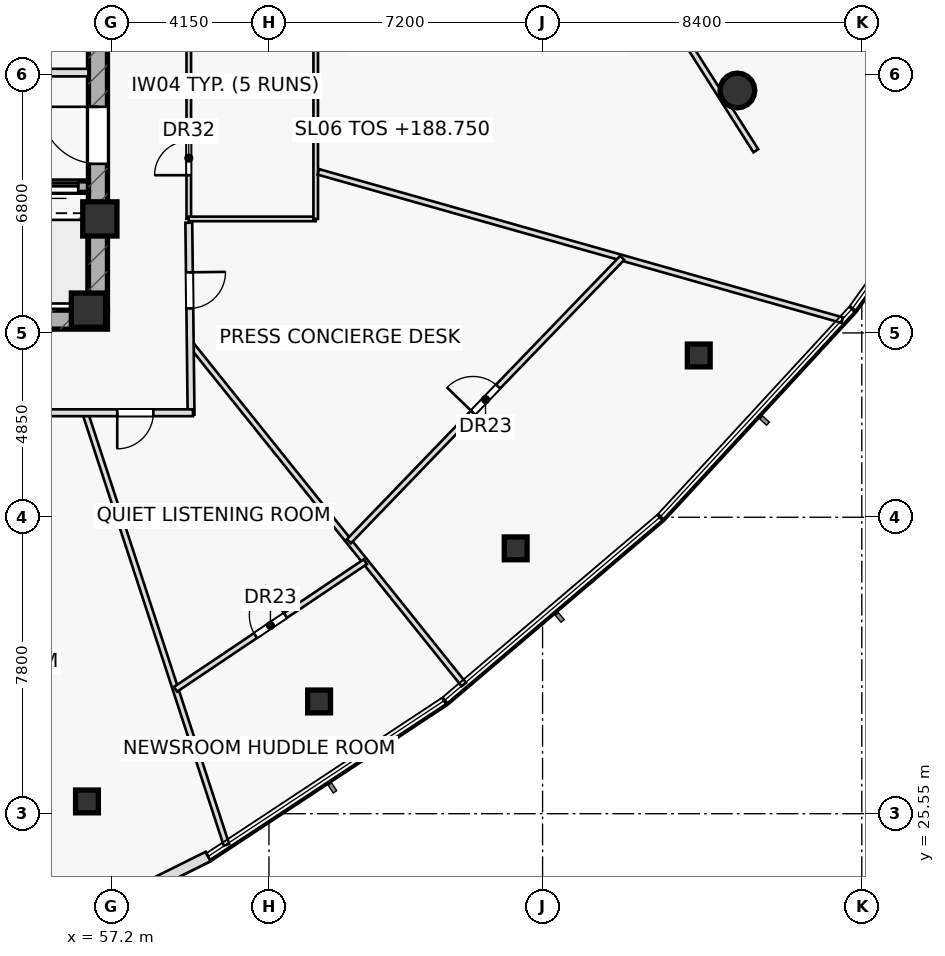
"""IFC4 building model, lengths in metres.
Left out: names, types, materials, properties, quantities, classifications, styles, units other than length and angle.
Written with IfcOpenShell. Run it as: python <this file> out.ifc"""

import sys

from ifc_helpers import new_model, si_unit, direction, frame, frame_2d, origin, origin_2d, place, context, subcontext, project, spatial, rectangle, hollow_rectangle, hollow_circle, extrude, element, fill, save


model = new_model("IFC4")
c1 = context("Model", 3, precision=1e-05, world=origin(), true_north=direction((0.0, 1.0)))
c2 = subcontext(c1, "Body", "Model", "MODEL_VIEW")
j1 = project(units=[si_unit("LENGTHUNIT", "METRE"), si_unit("PLANEANGLEUNIT", "RADIAN")], contexts=[c1])
p1 = place(None, origin())
s1 = spatial("IfcSite", under=j1, at=p1, CompositionType="ELEMENT")
p2 = place(p1, origin())
s2 = spatial("IfcBuilding", under=s1, at=p2, CompositionType="ELEMENT")
p3 = place(p2, frame((0.0, 0.0, 188.75)))
s3 = spatial("IfcBuildingStorey", under=s2, at=p3, CompositionType="ELEMENT", Elevation=188.75)
p4 = place(p3, frame((42.9, 38.55, 0.0), z_axis=(0.0, 0.0, 1.0), x_axis=(1.0, 0.0, 0.0)))
e1 = element("IfcWall", 1, at=p4, inside=s3, PredefinedType="SHEAR", context=c2, shape_type="SweptSolid", body=[
    extrude(rectangle(XDim=14.2, YDim=0.5, at=frame_2d((7.1, 0.0))), origin(), (0.0, 0.0, 1.0), 3.55),
])
p5 = place(p4, frame((0.78, 0.0, 0.0)))
e2 = element("IfcOpeningElement", 2, at=p5, cuts=e1, PredefinedType="OPENING", context=c2, shape_type="SweptSolid", body=[
    extrude(rectangle(XDim=1.05, YDim=2.2, at=frame_2d((0.525, 1.1))), frame((0.0, 0.26, 0.0), z_axis=(0.0, -1.0, 0.0), x_axis=(1.0, 0.0, 0.0)), (0.0, 0.0, 1.0), 0.52),
])
p6 = place(p3, frame((56.85, 38.8, 0.0), z_axis=(0.0, 0.0, 1.0), x_axis=(0.0, 1.0, 0.0)))
e3 = element("IfcWall", 3, at=p6, inside=s3, PredefinedType="SHEAR", context=c2, shape_type="SweptSolid", body=[
    extrude(rectangle(XDim=12.4, YDim=0.5, at=frame_2d((6.2, 0.0))), origin(), (0.0, 0.0, 1.0), 3.55),
])
p7 = place(p6, frame((3.85, 0.0, 0.0)))
e4 = element("IfcOpeningElement", 4, at=p7, cuts=e3, PredefinedType="OPENING", context=c2, shape_type="SweptSolid", body=[
    extrude(rectangle(XDim=1.5, YDim=2.2, at=frame_2d((0.75, 1.1))), frame((0.0, 0.26, 0.0), z_axis=(0.0, -1.0, 0.0), x_axis=(1.0, 0.0, 0.0)), (0.0, 0.0, 1.0), 0.52),
])
p8 = place(p3, frame((43.4, 42.05, 0.0), z_axis=(0.0, 0.0, 1.0), x_axis=(1.0, 0.0, 0.0)))
e5 = element("IfcWall", 5, at=p8, inside=s3, PredefinedType="SHEAR", context=c2, shape_type="SweptSolid", body=[
    extrude(rectangle(XDim=13.2, YDim=0.3, at=frame_2d((6.6, 0.0))), origin(), (0.0, 0.0, 1.0), 3.55),
])
p9 = place(p8, frame((8.37, 0.0, 0.0)))
e6 = element("IfcOpeningElement", 6, at=p9, cuts=e5, PredefinedType="OPENING", context=c2, shape_type="SweptSolid", body=[
    extrude(rectangle(XDim=1.1, YDim=2.15, at=frame_2d((0.55, 1.075))), frame((0.0, 0.16, 0.0), z_axis=(0.0, -1.0, 0.0), x_axis=(1.0, 0.0, 0.0)), (0.0, 0.0, 1.0), 0.32),
])
p10 = place(p8, frame((10.09, 0.0, 0.0)))
e7 = element("IfcOpeningElement", 7, at=p10, cuts=e5, PredefinedType="OPENING", context=c2, shape_type="SweptSolid", body=[
    extrude(rectangle(XDim=1.1, YDim=2.15, at=frame_2d((0.55, 1.075))), frame((0.0, 0.16, 0.0), z_axis=(0.0, -1.0, 0.0), x_axis=(1.0, 0.0, 0.0)), (0.0, 0.0, 1.0), 0.32),
])
p11 = place(p8, frame((11.83, 0.0, 0.0)))
e8 = element("IfcOpeningElement", 8, at=p11, cuts=e5, PredefinedType="OPENING", context=c2, shape_type="SweptSolid", body=[
    extrude(rectangle(XDim=1.1, YDim=2.15, at=frame_2d((0.55, 1.075))), frame((0.0, 0.16, 0.0), z_axis=(0.0, -1.0, 0.0), x_axis=(1.0, 0.0, 0.0)), (0.0, 0.0, 1.0), 0.32),
])
for number, where, z_axis, x_axis in (
    (9, (56.9, 41.2, 0.0), (0.0, 0.0, 1.0), (1.0, 0.0, 0.0)),
    (10, (56.6, 38.8, 0.0), (0.0, 0.0, 1.0), (1.0, 0.0, 0.0)),
):
    element("IfcColumn", number, at=place(p3, frame(where, z_axis=z_axis, x_axis=x_axis)), inside=s3, PredefinedType="COLUMN", context=c2, shape_type="SweptSolid", body=[
        extrude(rectangle(XDim=0.9, YDim=0.9, at=origin_2d()), origin(), (0.0, 0.0, 1.0), 3.55),
    ])
for number, where, z_axis, x_axis in (
    (11, (56.561, 25.873, 0.0), (0.0, 0.0, 1.0), (1.0, 0.0, 0.0)),
    (12, (62.669, 28.503, 0.0), (0.0, 0.0, 1.0), (1.0, 0.0, 0.0)),
    (13, (67.842, 32.532, 0.0), (0.0, 0.0, 1.0), (1.0, 0.0, 0.0)),
    (14, (72.659, 37.607, 0.0), (0.0, 0.0, 1.0), (1.0, 0.0, 0.0)),
):
    element("IfcColumn", number, at=place(p3, frame(where, z_axis=z_axis, x_axis=x_axis)), inside=s3, PredefinedType="COLUMN", context=c2, shape_type="SweptSolid", body=[
        extrude(hollow_rectangle(XDim=0.6, YDim=0.6, WallThickness=0.036, at=origin_2d()), origin(), (0.0, 0.0, 1.0), 3.55),
    ])
p12 = place(p3, frame((73.676, 44.58, 0.0), z_axis=(0.0, 0.0, 1.0), x_axis=(1.0, 0.0, 0.0)))
e15 = element("IfcColumn", 15, at=p12, inside=s3, PredefinedType="COLUMN", context=c2, shape_type="SweptSolid", body=[
    extrude(hollow_circle(Radius=0.457, WallThickness=0.04, at=origin_2d()), origin(), (0.0, 0.0, 1.0), 3.55),
])
p13 = place(p3, frame((50.65, 45.05, 0.0), z_axis=(0.0, 0.0, 1.0), x_axis=(1.0, 0.0, 0.0)))
e16 = element("IfcWall", 16, at=p13, inside=s3, PredefinedType="PARTITIONING", context=c2, shape_type="SweptSolid", body=[
    extrude(rectangle(XDim=5.95, YDim=0.2, at=frame_2d((2.975, 0.0))), origin(), (0.0, 0.0, 1.0), 3.55),
])
p14 = place(p13, frame((1.35, 0.0, 0.0)))
e17 = element("IfcOpeningElement", 17, at=p14, cuts=e16, PredefinedType="OPENING", context=c2, shape_type="SweptSolid", body=[
    extrude(rectangle(XDim=1.5, YDim=2.2, at=frame_2d((0.75, 1.1))), frame((0.0, 0.11, 0.0), z_axis=(0.0, -1.0, 0.0), x_axis=(1.0, 0.0, 0.0)), (0.0, 0.0, 1.0), 0.22),
])
p15 = place(p3, frame((74.163, 42.993, 0.0), z_axis=(0.0, 0.0, 1.0), x_axis=(-0.53628142437, 0.844039237166, 0.0)))
e18 = element("IfcWall", 18, at=p15, inside=s3, PredefinedType="PARTITIONING", context=c2, shape_type="SweptSolid", body=[
    extrude(rectangle(XDim=10.267, YDim=0.15, at=frame_2d((5.133, 0.0))), origin(), (0.0, 0.0, 1.0), 2.935),
])
p16 = place(p3, frame((59.24, 41.2, 0.0), z_axis=(0.0, 0.0, 1.0), x_axis=(0.0, 1.0, 0.0)))
e19 = element("IfcWall", 19, at=p16, inside=s3, PredefinedType="PARTITIONING", context=c2, shape_type="SweptSolid", body=[
    extrude(rectangle(XDim=7.0, YDim=0.12, at=frame_2d((3.5, 0.0))), origin(), (0.0, 0.0, 1.0), 3.55),
])
p17 = place(p16, frame((1.15, 0.0, 0.0)))
e20 = element("IfcOpeningElement", 20, at=p17, cuts=e19, PredefinedType="OPENING", context=c2, shape_type="SweptSolid", body=[
    extrude(rectangle(XDim=0.9, YDim=2.05, at=frame_2d((0.45, 1.025))), frame((0.0, 0.07, 0.0), z_axis=(0.0, -1.0, 0.0), x_axis=(1.0, 0.0, 0.0)), (0.0, 0.0, 1.0), 0.14),
])
p18 = place(p16, frame((4.7, 0.0, 0.0)))
e21 = element("IfcOpeningElement", 21, at=p18, cuts=e19, PredefinedType="OPENING", context=c2, shape_type="SweptSolid", body=[
    extrude(rectangle(XDim=0.9, YDim=2.05, at=frame_2d((0.45, 1.025))), frame((0.0, 0.07, 0.0), z_axis=(0.0, -1.0, 0.0), x_axis=(1.0, 0.0, 0.0)), (0.0, 0.0, 1.0), 0.14),
])
for number, where, z_axis, x_axis in (
    (22, (59.24, 41.2, 0.0), (0.0, 0.0, 1.0), (1.0, 0.0, 0.0)),
    (23, (59.24, 44.65, 0.0), (0.0, 0.0, 1.0), (1.0, 0.0, 0.0)),
):
    element("IfcWall", number, at=place(p3, frame(where, z_axis=z_axis, x_axis=x_axis)), inside=s3, PredefinedType="PARTITIONING", context=c2, shape_type="SweptSolid", body=[
        extrude(rectangle(XDim=3.34, YDim=0.12, at=frame_2d((1.67, 0.0))), origin(), (0.0, 0.0, 1.0), 3.55),
    ])
p19 = place(p3, frame((62.58, 41.2, 0.0), z_axis=(0.0, 0.0, 1.0), x_axis=(0.0, 1.0, 0.0)))
e24 = element("IfcWall", 24, at=p19, inside=s3, PredefinedType="PARTITIONING", context=c2, shape_type="SweptSolid", body=[
    extrude(rectangle(XDim=7.0, YDim=0.12, at=frame_2d((3.5, 0.0))), origin(), (0.0, 0.0, 1.0), 3.55),
])
p20 = place(p3, frame((56.512, 36.1, 0.0), z_axis=(0.0, 0.0, 1.0), x_axis=(0.310932807992, -0.950431895989, 0.0)))
e25 = element("IfcWall", 25, at=p20, inside=s3, PredefinedType="PARTITIONING", context=c2, shape_type="SweptSolid", body=[
    extrude(rectangle(XDim=11.962, YDim=0.15, at=frame_2d((5.981, 0.0))), origin(), (0.0, 0.0, 1.0), 2.935),
])
p21 = place(p3, frame((59.278, 37.923, 0.0), z_axis=(0.0, 0.0, 1.0), x_axis=(0.625817580047, -0.7799694587, 0.0)))
e26 = element("IfcWall", 26, at=p21, inside=s3, PredefinedType="PARTITIONING", context=c2, shape_type="SweptSolid", body=[
    extrude(rectangle(XDim=11.504, YDim=0.15, at=frame_2d((5.752, 0.0))), origin(), (0.0, 0.0, 1.0), 2.935),
])
p22 = place(p3, frame((62.65, 42.438, 0.0), z_axis=(0.0, 0.0, 1.0), x_axis=(0.962193743566, -0.272365930033, 0.0)))
e27 = element("IfcWall", 27, at=p22, inside=s3, PredefinedType="PARTITIONING", context=c2, shape_type="SweptSolid", body=[
    extrude(rectangle(XDim=14.326, YDim=0.15, at=frame_2d((7.163, 0.0))), origin(), (0.0, 0.0, 1.0), 2.935),
])
p23 = place(p3, frame((63.454, 32.719, 0.0), z_axis=(0.0, 0.0, 1.0), x_axis=(0.694169154848, 0.719811909083, 0.0)))
e28 = element("IfcWall", 28, at=p23, inside=s3, PredefinedType="PARTITIONING", context=c2, shape_type="SweptSolid", body=[
    extrude(rectangle(XDim=10.359, YDim=0.15, at=frame_2d((5.179, 0.0))), origin(), (0.0, 0.0, 1.0), 2.935),
])
p24 = place(p23, frame((4.704, 0.0, 0.0)))
e29 = element("IfcOpeningElement", 29, at=p24, cuts=e28, PredefinedType="OPENING", context=c2, shape_type="SweptSolid", body=[
    extrude(rectangle(XDim=0.95, YDim=2.05, at=frame_2d((0.475, 1.025))), frame((0.0, 0.085, 0.0), z_axis=(0.0, -1.0, 0.0), x_axis=(1.0, 0.0, 0.0)), (0.0, 0.0, 1.0), 0.17),
])
p25 = place(p3, frame((58.892, 28.824, 0.0), z_axis=(0.0, 0.0, 1.0), x_axis=(0.829965651244, 0.557814501205, 0.0)))
e30 = element("IfcWall", 30, at=p25, inside=s3, PredefinedType="PARTITIONING", context=c2, shape_type="SweptSolid", body=[
    extrude(rectangle(XDim=6.017, YDim=0.15, at=frame_2d((3.008, 0.0))), origin(), (0.0, 0.0, 1.0), 2.935),
])
p26 = place(p25, frame((2.533, 0.0, 0.0)))
e31 = element("IfcOpeningElement", 31, at=p26, cuts=e30, PredefinedType="OPENING", context=c2, shape_type="SweptSolid", body=[
    extrude(rectangle(XDim=0.95, YDim=2.05, at=frame_2d((0.475, 1.025))), frame((0.0, 0.085, 0.0), z_axis=(0.0, -1.0, 0.0), x_axis=(1.0, 0.0, 0.0)), (0.0, 0.0, 1.0), 0.17),
])
p27 = place(p3, frame((59.24, 41.1, 0.0), z_axis=(0.0, 0.0, 1.0), x_axis=(0.011891834917, -0.999929289631, 0.0)))
e32 = element("IfcWall", 32, at=p27, inside=s3, PredefinedType="PARTITIONING", context=c2, shape_type="SweptSolid", body=[
    extrude(rectangle(XDim=5.05, YDim=0.18, at=frame_2d((2.525, 0.0))), origin(), (0.0, 0.0, 1.0), 2.935),
])
p28 = place(p27, frame((1.305, 0.0, 0.0)))
e33 = element("IfcOpeningElement", 33, at=p28, cuts=e32, PredefinedType="OPENING", context=c2, shape_type="SweptSolid", body=[
    extrude(rectangle(XDim=0.95, YDim=2.05, at=frame_2d((0.475, 1.025))), frame((0.0, 0.1, 0.0), z_axis=(0.0, -1.0, 0.0), x_axis=(1.0, 0.0, 0.0)), (0.0, 0.0, 1.0), 0.2),
])
p29 = place(p3, frame((59.35, 36.1, 0.0), z_axis=(0.0, 0.0, 1.0), x_axis=(-1.0, 0.0, 0.0)))
e34 = element("IfcWall", 34, at=p29, inside=s3, PredefinedType="PARTITIONING", context=c2, shape_type="SweptSolid", body=[
    extrude(rectangle(XDim=19.6, YDim=0.18, at=frame_2d((9.8, 0.0))), origin(), (0.0, 0.0, 1.0), 2.935),
])
p30 = place(p29, frame((1.042, 0.0, 0.0)))
e35 = element("IfcOpeningElement", 35, at=p30, cuts=e34, PredefinedType="OPENING", context=c2, shape_type="SweptSolid", body=[
    extrude(rectangle(XDim=0.95, YDim=2.05, at=frame_2d((0.475, 1.025))), frame((0.0, 0.1, 0.0), z_axis=(0.0, -1.0, 0.0), x_axis=(1.0, 0.0, 0.0)), (0.0, 0.0, 1.0), 0.2),
])
p31 = place(p29, frame((6.048, 0.0, 0.0)))
e36 = element("IfcOpeningElement", 36, at=p31, cuts=e34, PredefinedType="OPENING", context=c2, shape_type="SweptSolid", body=[
    extrude(rectangle(XDim=0.95, YDim=2.05, at=frame_2d((0.475, 1.025))), frame((0.0, 0.1, 0.0), z_axis=(0.0, -1.0, 0.0), x_axis=(1.0, 0.0, 0.0)), (0.0, 0.0, 1.0), 0.2),
])
p32 = place(p29, frame((14.336, 0.0, 0.0)))
e37 = element("IfcOpeningElement", 37, at=p32, cuts=e34, PredefinedType="OPENING", context=c2, shape_type="SweptSolid", body=[
    extrude(rectangle(XDim=0.95, YDim=2.05, at=frame_2d((0.475, 1.025))), frame((0.0, 0.1, 0.0), z_axis=(0.0, -1.0, 0.0), x_axis=(1.0, 0.0, 0.0)), (0.0, 0.0, 1.0), 0.2),
])
p33 = place(p3, frame((53.061, 21.093, 0.0), z_axis=(0.0, 0.0, 1.0), x_axis=(0.895131780242, 0.445801633017, 0.0)))
e38 = element("IfcWall", 38, at=p33, inside=s3, PredefinedType="STANDARD", context=c2, shape_type="SweptSolid", body=[
    extrude(rectangle(XDim=7.473, YDim=0.28, at=frame_2d((3.736, 0.0))), origin(), (0.0, 0.0, 1.0), 3.55),
])
p34 = place(p7, origin())
e39 = element("IfcDoor", 39, at=p34, inside=s3, OperationType="SINGLE_SWING_RIGHT", PredefinedType="DOOR", context=c2, shape_type="SweptSolid", body=[
    extrude(rectangle(XDim=1.5, YDim=2.2, at=frame_2d((0.75, 1.1))), frame((0.0, 0.025, 0.0), z_axis=(0.0, -1.0, 0.0), x_axis=(1.0, 0.0, 0.0)), (0.0, 0.0, 1.0), 0.05),
])
fill(e4, e39)
p35 = place(p17, origin())
e40 = element("IfcDoor", 40, at=p35, inside=s3, OperationType="SINGLE_SWING_LEFT", PredefinedType="DOOR", context=c2, shape_type="SweptSolid", body=[
    extrude(rectangle(XDim=0.9, YDim=2.05, at=frame_2d((0.45, 1.025))), frame((0.0, 0.025, 0.0), z_axis=(0.0, -1.0, 0.0), x_axis=(1.0, 0.0, 0.0)), (0.0, 0.0, 1.0), 0.05),
])
fill(e20, e40)
p36 = place(p24, origin())
e41 = element("IfcDoor", 41, at=p36, inside=s3, OperationType="SINGLE_SWING_LEFT", PredefinedType="DOOR", context=c2, shape_type="SweptSolid", body=[
    extrude(rectangle(XDim=0.95, YDim=2.05, at=frame_2d((0.475, 1.025))), frame((0.0, 0.025, 0.0), z_axis=(0.0, -1.0, 0.0), x_axis=(1.0, 0.0, 0.0)), (0.0, 0.0, 1.0), 0.05),
])
fill(e29, e41)
p37 = place(p26, origin())
e42 = element("IfcDoor", 42, at=p37, inside=s3, OperationType="SINGLE_SWING_RIGHT", PredefinedType="DOOR", context=c2, shape_type="SweptSolid", body=[
    extrude(rectangle(XDim=0.95, YDim=2.05, at=frame_2d((0.475, 1.025))), frame((0.0, 0.025, 0.0), z_axis=(0.0, -1.0, 0.0), x_axis=(1.0, 0.0, 0.0)), (0.0, 0.0, 1.0), 0.05),
])
fill(e31, e42)
p38 = place(p28, origin())
e43 = element("IfcDoor", 43, at=p38, inside=s3, OperationType="SINGLE_SWING_LEFT", PredefinedType="DOOR", context=c2, shape_type="SweptSolid", body=[
    extrude(rectangle(XDim=0.95, YDim=2.05, at=frame_2d((0.475, 1.025))), frame((0.0, 0.025, 0.0), z_axis=(0.0, -1.0, 0.0), x_axis=(1.0, 0.0, 0.0)), (0.0, 0.0, 1.0), 0.05),
])
fill(e33, e43)
p39 = place(p30, origin())
e44 = element("IfcDoor", 44, at=p39, inside=s3, OperationType="SINGLE_SWING_RIGHT", PredefinedType="DOOR", context=c2, shape_type="SweptSolid", body=[
    extrude(rectangle(XDim=0.95, YDim=2.05, at=frame_2d((0.475, 1.025))), frame((0.0, 0.025, 0.0), z_axis=(0.0, -1.0, 0.0), x_axis=(1.0, 0.0, 0.0)), (0.0, 0.0, 1.0), 0.05),
])
fill(e35, e44)
p40 = place(p11, origin())
e45 = element("IfcDoor", 45, at=p40, inside=s3, OperationType="SLIDING_TO_LEFT", PredefinedType="DOOR", context=c2, shape_type="SweptSolid", body=[
    extrude(rectangle(XDim=1.1, YDim=2.15, at=frame_2d((0.55, 1.075))), frame((0.0, 0.025, 0.0), z_axis=(0.0, -1.0, 0.0), x_axis=(1.0, 0.0, 0.0)), (0.0, 0.0, 1.0), 0.05),
])
fill(e8, e45)
save(model, sys.argv[1])
